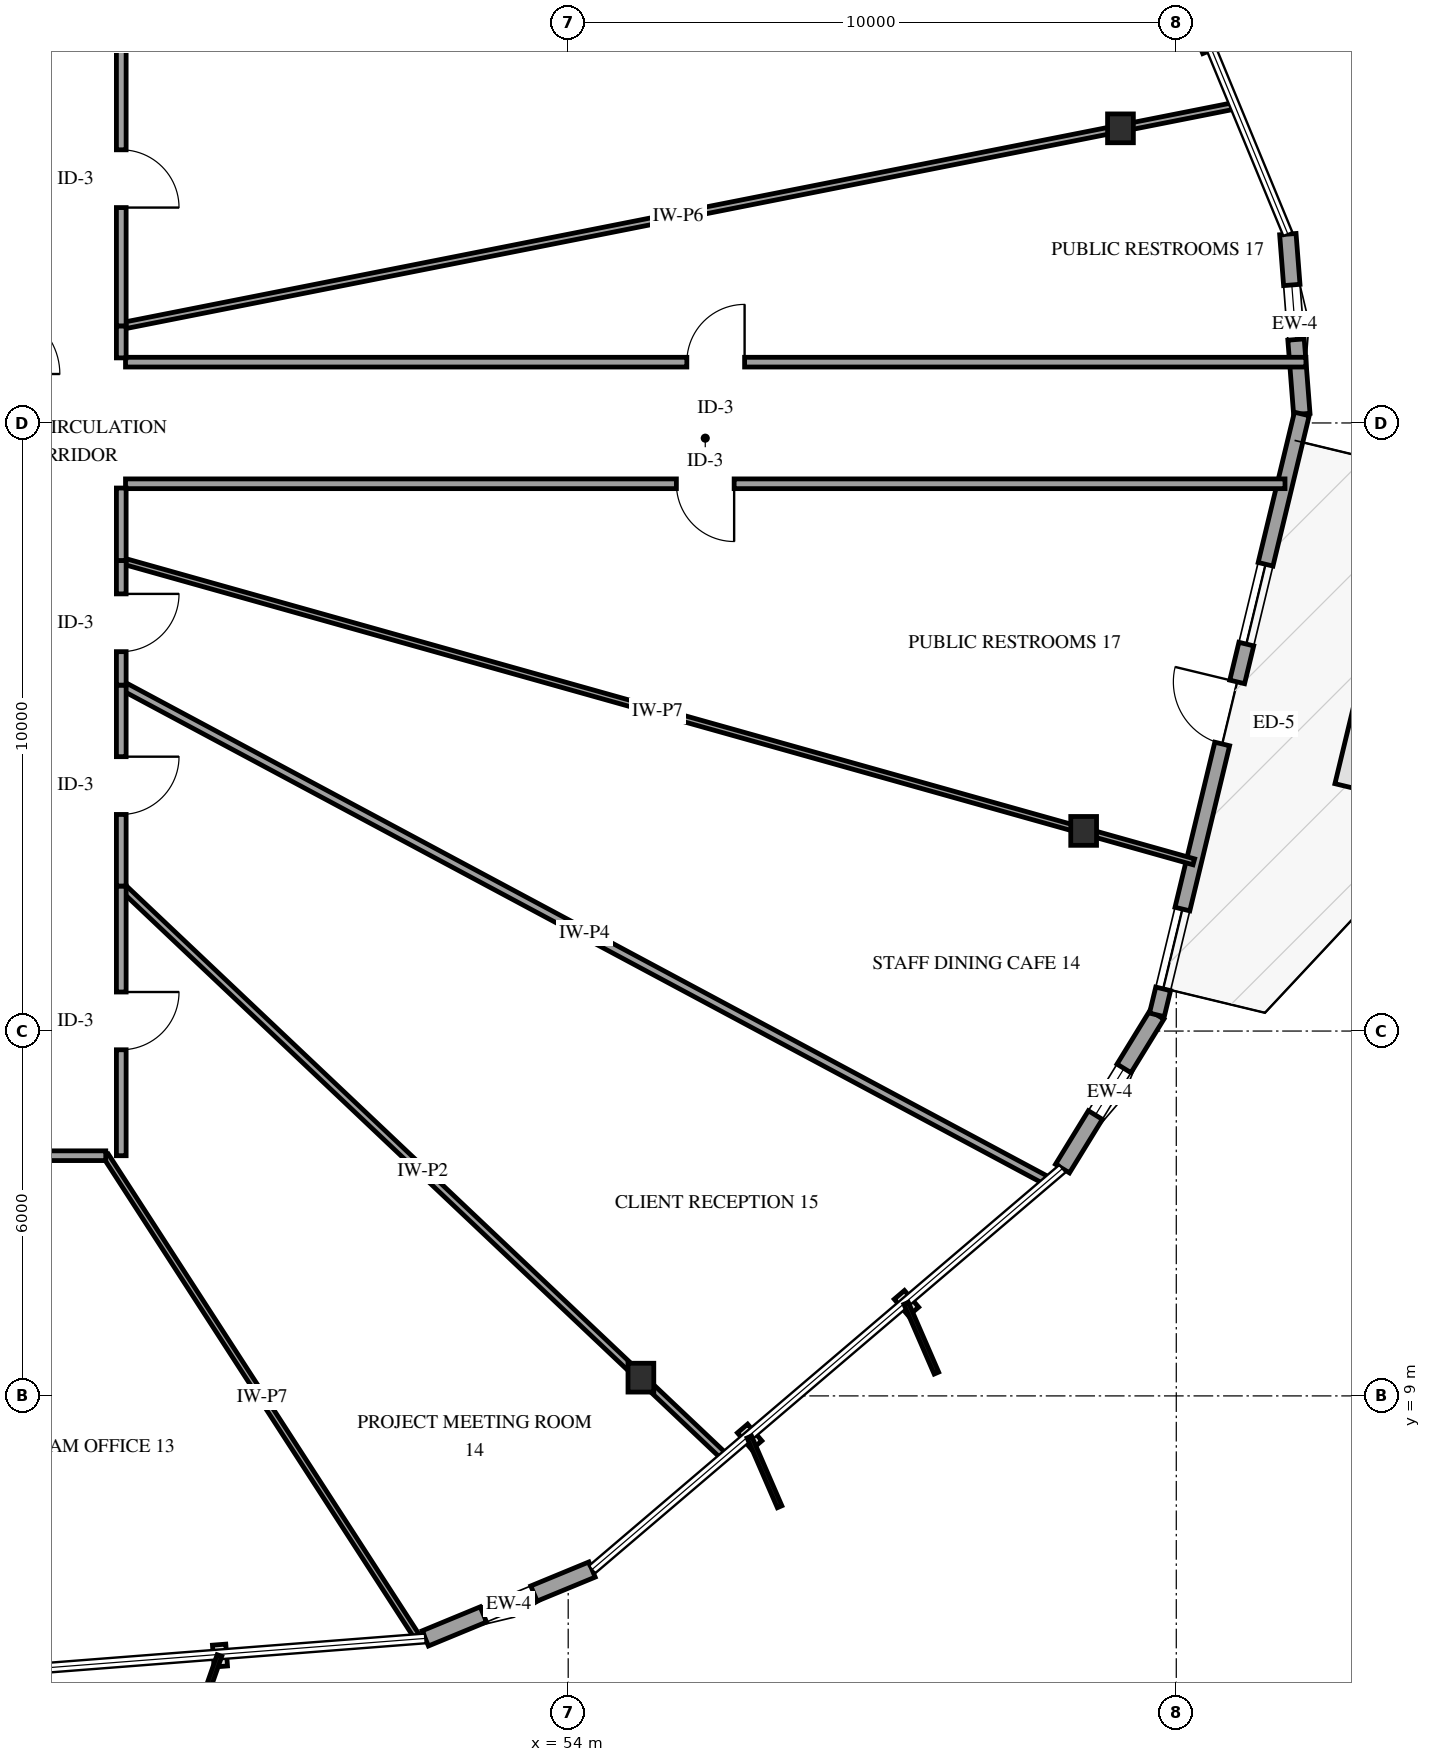
"""IFC4 building model, lengths in metres.
Left out: names, types, materials, properties, quantities, classifications, styles, units other than length and angle.
Written with IfcOpenShell. Run it as: python <this file> out.ifc"""

import sys

from ifc_helpers import new_model, si_unit, direction, frame, frame_2d, origin, origin_2d, place, context, subcontext, project, spatial, rectangle, i_section, extrude, element, fill, save


model = new_model("IFC4")
c1 = context("Model", 3, precision=1e-05, world=origin(), true_north=direction((0.0, 1.0)))
c2 = subcontext(c1, "Body", "Model", "MODEL_VIEW")
j1 = project(units=[si_unit("LENGTHUNIT", "METRE"), si_unit("PLANEANGLEUNIT", "RADIAN")], contexts=[c1])
p1 = place(None, origin())
s1 = spatial("IfcSite", under=j1, at=p1, CompositionType="ELEMENT")
p2 = place(p1, origin())
s2 = spatial("IfcBuilding", under=s1, at=p2, CompositionType="ELEMENT")
p3 = place(p2, frame((0.0, 0.0, 50.6)))
s3 = spatial("IfcBuildingStorey", under=s2, at=p3, CompositionType="ELEMENT", Elevation=50.6)
for number, where, z_axis, x_axis in (
    (1, (63.082, 29.845, 0.0), (0.0, 0.0, 1.0), (1.0, 0.0, 0.0)),
    (2, (55.196, 9.3, 0.0), (0.0, 0.0, 1.0), (1.0, 0.0, 0.0)),
    (3, (62.477, 18.292, 0.0), (0.0, 0.0, 1.0), (1.0, 0.0, 0.0)),
):
    element("IfcColumn", number, at=place(p3, frame(where, z_axis=z_axis, x_axis=x_axis)), inside=s3, PredefinedType="COLUMN", context=c2, shape_type="SweptSolid", body=[
        extrude(i_section(OverallWidth=0.424, OverallDepth=0.474, WebThickness=0.048, FlangeThickness=0.077, FilletRadius=0.038, at=origin_2d()), origin(), (0.0, 0.0, 1.0), 4.0),
    ])
p4 = place(p3, frame((51.65, 5.012, 0.0), z_axis=(0.0, 0.0, 1.0), x_axis=(0.924287306496, 0.381697491544, 0.0)))
e4 = element("IfcWall", 4, at=p4, inside=s3, PredefinedType="SOLIDWALL", context=c2, shape_type="SweptSolid", body=[
    extrude(rectangle(XDim=2.967, YDim=0.27, at=frame_2d((1.483, 0.0))), origin(), (0.0, 0.0, 1.0), 3.079),
])
p5 = place(p4, frame((1.033, 0.0, 0.75)))
e5 = element("IfcOpeningElement", 5, at=p5, cuts=e4, PredefinedType="OPENING", context=c2, shape_type="SweptSolid", body=[
    extrude(rectangle(XDim=0.9, YDim=1.5, at=frame_2d((0.45, 0.75))), frame((0.0, 0.145, 0.0), z_axis=(0.0, -1.0, 0.0), x_axis=(1.0, 0.0, 0.0)), (0.0, 0.0, 1.0), 0.29),
])
p6 = place(p3, frame((62.128, 12.738, 0.0), z_axis=(0.0, 0.0, 1.0), x_axis=(0.523399327402, 0.852087521371, 0.0)))
e6 = element("IfcWall", 6, at=p6, inside=s3, PredefinedType="SOLIDWALL", context=c2, shape_type="SweptSolid", body=[
    extrude(rectangle(XDim=2.967, YDim=0.27, at=frame_2d((1.483, 0.0))), origin(), (0.0, 0.0, 1.0), 3.079),
])
p7 = place(p6, frame((1.033, 0.0, 0.75)))
e7 = element("IfcOpeningElement", 7, at=p7, cuts=e6, PredefinedType="OPENING", context=c2, shape_type="SweptSolid", body=[
    extrude(rectangle(XDim=0.9, YDim=1.5, at=frame_2d((0.45, 0.75))), frame((0.0, 0.145, 0.0), z_axis=(0.0, -1.0, 0.0), x_axis=(1.0, 0.0, 0.0)), (0.0, 0.0, 1.0), 0.29),
])
p8 = place(p3, frame((66.064, 25.148, 0.0), z_axis=(0.0, 0.0, 1.0), x_axis=(-0.077363609715, 0.997002944776, 0.0)))
e8 = element("IfcWall", 8, at=p8, inside=s3, PredefinedType="SOLIDWALL", context=c2, shape_type="SweptSolid", body=[
    extrude(rectangle(XDim=2.966, YDim=0.27, at=frame_2d((1.483, 0.0))), origin(), (0.0, 0.0, 1.0), 3.079),
])
p9 = place(p8, frame((1.228, 0.0, 0.75)))
e9 = element("IfcOpeningElement", 9, at=p9, cuts=e8, PredefinedType="OPENING", context=c2, shape_type="SweptSolid", body=[
    extrude(rectangle(XDim=0.9, YDim=1.5, at=frame_2d((0.45, 0.75))), frame((0.0, 0.145, 0.0), z_axis=(0.0, -1.0, 0.0), x_axis=(1.0, 0.0, 0.0)), (0.0, 0.0, 1.0), 0.29),
])
p10 = place(p3, frame((63.681, 15.266, 0.0), z_axis=(0.0, 0.0, 1.0), x_axis=(0.234457403368, 0.972126394049, 0.0)))
e10 = element("IfcWall", 10, at=p10, inside=s3, PredefinedType="SOLIDWALL", context=c2, shape_type="SweptSolid", body=[
    extrude(rectangle(XDim=10.165, YDim=0.25, at=frame_2d((5.083, 0.0))), origin(), (0.0, 0.0, 1.0), 3.079),
])
p11 = place(p10, frame((4.583, 0.0, 0.0)))
e11 = element("IfcOpeningElement", 11, at=p11, cuts=e10, PredefinedType="OPENING", context=c2, shape_type="SweptSolid", body=[
    extrude(rectangle(XDim=1.05, YDim=2.15, at=frame_2d((0.525, 1.075))), frame((0.0, 0.135, 0.0), z_axis=(0.0, -1.0, 0.0), x_axis=(1.0, 0.0, 0.0)), (0.0, 0.0, 1.0), 0.27),
])
p12 = place(p10, frame((0.44, 0.0, 0.72)))
e12 = element("IfcOpeningElement", 12, at=p12, cuts=e10, PredefinedType="OPENING", context=c2, shape_type="SweptSolid", body=[
    extrude(rectangle(XDim=1.35, YDim=1.65, at=frame_2d((0.675, 0.825))), frame((0.0, 0.135, 0.0), z_axis=(0.0, -1.0, 0.0), x_axis=(1.0, 0.0, 0.0)), (0.0, 0.0, 1.0), 0.27),
])
p13 = place(p10, frame((6.273, 0.0, 0.72)))
e13 = element("IfcOpeningElement", 13, at=p13, cuts=e10, PredefinedType="OPENING", context=c2, shape_type="SweptSolid", body=[
    extrude(rectangle(XDim=1.35, YDim=1.65, at=frame_2d((0.675, 0.825))), frame((0.0, 0.135, 0.0), z_axis=(0.0, -1.0, 0.0), x_axis=(1.0, 0.0, 0.0)), (0.0, 0.0, 1.0), 0.27),
])
p14 = place(p3, frame((46.72, 26.0, 0.0), z_axis=(0.0, 0.0, 1.0), x_axis=(1.0, 0.0, 0.0)))
e14 = element("IfcWall", 14, at=p14, inside=s3, PredefinedType="PARTITIONING", context=c2, shape_type="SweptSolid", body=[
    extrude(rectangle(XDim=19.412, YDim=0.16, at=frame_2d((9.706, 0.0))), origin(), (0.0, 0.0, 1.0), 3.7),
])
p15 = place(p14, frame((9.231, 0.0, 0.0)))
e15 = element("IfcOpeningElement", 15, at=p15, cuts=e14, PredefinedType="OPENING", context=c2, shape_type="SweptSolid", body=[
    extrude(rectangle(XDim=0.95, YDim=2.15, at=frame_2d((0.475, 1.075))), frame((0.0, 0.09, 0.0), z_axis=(0.0, -1.0, 0.0), x_axis=(1.0, 0.0, 0.0)), (0.0, 0.0, 1.0), 0.18),
])
p16 = place(p3, frame((65.788, 24.0, 0.0), z_axis=(0.0, 0.0, 1.0), x_axis=(-1.0, 0.0, 0.0)))
e16 = element("IfcWall", 16, at=p16, inside=s3, PredefinedType="PARTITIONING", context=c2, shape_type="SweptSolid", body=[
    extrude(rectangle(XDim=19.068, YDim=0.16, at=frame_2d((9.534, 0.0))), origin(), (0.0, 0.0, 1.0), 3.7),
])
p17 = place(p16, frame((9.059, 0.0, 0.0)))
e17 = element("IfcOpeningElement", 17, at=p17, cuts=e16, PredefinedType="OPENING", context=c2, shape_type="SweptSolid", body=[
    extrude(rectangle(XDim=0.95, YDim=2.15, at=frame_2d((0.475, 1.075))), frame((0.0, 0.09, 0.0), z_axis=(0.0, -1.0, 0.0), x_axis=(1.0, 0.0, 0.0)), (0.0, 0.0, 1.0), 0.18),
])
p18 = place(p3, frame((46.65, 26.593, 0.0), z_axis=(0.0, 0.0, 1.0), x_axis=(0.980976030909, 0.194128892185, 0.0)))
e18 = element("IfcWall", 18, at=p18, inside=s3, PredefinedType="PARTITIONING", context=c2, shape_type="SweptSolid", body=[
    extrude(rectangle(XDim=18.668, YDim=0.11, at=frame_2d((9.334, 0.0))), origin(), (0.0, 0.0, 1.0), 2.995),
])
p19 = place(p3, frame((46.65, 22.738, 0.0), z_axis=(0.0, 0.0, 1.0), x_axis=(0.962731430865, -0.270459224329, 0.0)))
e19 = element("IfcWall", 19, at=p19, inside=s3, PredefinedType="PARTITIONING", context=c2, shape_type="SweptSolid", body=[
    extrude(rectangle(XDim=18.321, YDim=0.1, at=frame_2d((9.161, 0.0))), origin(), (0.0, 0.0, 1.0), 2.995),
])
p20 = place(p3, frame((46.65, 20.689, 0.0), z_axis=(0.0, 0.0, 1.0), x_axis=(0.881605315222, -0.471987360182, 0.0)))
e20 = element("IfcWall", 20, at=p20, inside=s3, PredefinedType="PARTITIONING", context=c2, shape_type="SweptSolid", body=[
    extrude(rectangle(XDim=17.282, YDim=0.14, at=frame_2d((8.641, 0.0))), origin(), (0.0, 0.0, 1.0), 3.078),
])
p21 = place(p3, frame((46.65, 17.385, 0.0), z_axis=(0.0, 0.0, 1.0), x_axis=(0.726395560774, -0.68727686509, 0.0)))
e21 = element("IfcWall", 21, at=p21, inside=s3, PredefinedType="PARTITIONING", context=c2, shape_type="SweptSolid", body=[
    extrude(rectangle(XDim=13.655, YDim=0.12, at=frame_2d((6.828, 0.0))), origin(), (0.0, 0.0, 1.0), 2.995),
])
p22 = place(p3, frame((46.395, 12.95, 0.0), z_axis=(0.0, 0.0, 1.0), x_axis=(0.54324379199, -0.839575001095, 0.0)))
e22 = element("IfcWall", 22, at=p22, inside=s3, PredefinedType="PARTITIONING", context=c2, shape_type="SweptSolid", body=[
    extrude(rectangle(XDim=9.466, YDim=0.1, at=frame_2d((4.733, 0.0))), origin(), (0.0, 0.0, 1.0), 3.078),
])
p23 = place(p3, frame((46.65, 31.442, 0.0), z_axis=(0.0, 0.0, 1.0), x_axis=(0.0, -1.0, 0.0)))
e23 = element("IfcWall", 23, at=p23, inside=s3, PredefinedType="PARTITIONING", context=c2, shape_type="SweptSolid", body=[
    extrude(rectangle(XDim=4.849, YDim=0.16, at=frame_2d((2.424, 0.0))), origin(), (0.0, 0.0, 1.0), 3.7),
])
p24 = place(p23, frame((1.95, 0.0, 0.0)))
e24 = element("IfcOpeningElement", 24, at=p24, cuts=e23, PredefinedType="OPENING", context=c2, shape_type="SweptSolid", body=[
    extrude(rectangle(XDim=0.95, YDim=2.15, at=frame_2d((0.475, 1.075))), frame((0.0, 0.09, 0.0), z_axis=(0.0, -1.0, 0.0), x_axis=(1.0, 0.0, 0.0)), (0.0, 0.0, 1.0), 0.18),
])
p25 = place(p3, frame((46.65, 17.385, 0.0), z_axis=(0.0, 0.0, 1.0), x_axis=(0.0, -1.0, 0.0)))
e25 = element("IfcWall", 25, at=p25, inside=s3, PredefinedType="PARTITIONING", context=c2, shape_type="SweptSolid", body=[
    extrude(rectangle(XDim=4.435, YDim=0.16, at=frame_2d((2.218, 0.0))), origin(), (0.0, 0.0, 1.0), 3.7),
])
p26 = place(p25, frame((1.743, 0.0, 0.0)))
e26 = element("IfcOpeningElement", 26, at=p26, cuts=e25, PredefinedType="OPENING", context=c2, shape_type="SweptSolid", body=[
    extrude(rectangle(XDim=0.95, YDim=2.15, at=frame_2d((0.475, 1.075))), frame((0.0, 0.09, 0.0), z_axis=(0.0, -1.0, 0.0), x_axis=(1.0, 0.0, 0.0)), (0.0, 0.0, 1.0), 0.18),
])
p27 = place(p3, frame((46.395, 12.95, 0.0), z_axis=(0.0, 0.0, 1.0), x_axis=(-1.0, 0.0, 0.0)))
e27 = element("IfcWall", 27, at=p27, inside=s3, PredefinedType="PARTITIONING", context=c2, shape_type="SweptSolid", body=[
    extrude(rectangle(XDim=4.301, YDim=0.16, at=frame_2d((2.15, 0.0))), origin(), (0.0, 0.0, 1.0), 3.7),
])
p28 = place(p27, frame((1.676, 0.0, 0.0)))
e28 = element("IfcOpeningElement", 28, at=p28, cuts=e27, PredefinedType="OPENING", context=c2, shape_type="SweptSolid", body=[
    extrude(rectangle(XDim=0.95, YDim=2.15, at=frame_2d((0.475, 1.075))), frame((0.0, 0.09, 0.0), z_axis=(0.0, -1.0, 0.0), x_axis=(1.0, 0.0, 0.0)), (0.0, 0.0, 1.0), 0.18),
])
p29 = place(p3, frame((46.65, 20.689, 0.0), z_axis=(0.0, 0.0, 1.0), x_axis=(0.0, -1.0, 0.0)))
e29 = element("IfcWall", 29, at=p29, inside=s3, PredefinedType="PARTITIONING", context=c2, shape_type="SweptSolid", body=[
    extrude(rectangle(XDim=3.304, YDim=0.16, at=frame_2d((1.652, 0.0))), origin(), (0.0, 0.0, 1.0), 3.7),
])
p30 = place(p29, frame((1.177, 0.0, 0.0)))
e30 = element("IfcOpeningElement", 30, at=p30, cuts=e29, PredefinedType="OPENING", context=c2, shape_type="SweptSolid", body=[
    extrude(rectangle(XDim=0.95, YDim=2.15, at=frame_2d((0.475, 1.075))), frame((0.0, 0.09, 0.0), z_axis=(0.0, -1.0, 0.0), x_axis=(1.0, 0.0, 0.0)), (0.0, 0.0, 1.0), 0.18),
])
p31 = place(p3, frame((46.65, 22.738, 0.0), z_axis=(0.0, 0.0, 1.0), x_axis=(0.0, -1.0, 0.0)))
e31 = element("IfcWall", 31, at=p31, inside=s3, PredefinedType="PARTITIONING", context=c2, shape_type="SweptSolid", body=[
    extrude(rectangle(XDim=2.049, YDim=0.16, at=frame_2d((1.024, 0.0))), origin(), (0.0, 0.0, 1.0), 3.7),
])
p32 = place(p31, frame((0.549, 0.0, 0.0)))
e32 = element("IfcOpeningElement", 32, at=p32, cuts=e31, PredefinedType="OPENING", context=c2, shape_type="SweptSolid", body=[
    extrude(rectangle(XDim=0.95, YDim=2.15, at=frame_2d((0.475, 1.075))), frame((0.0, 0.09, 0.0), z_axis=(0.0, -1.0, 0.0), x_axis=(1.0, 0.0, 0.0)), (0.0, 0.0, 1.0), 0.18),
])
p33 = place(p3, frame((46.65, 23.93, 0.0), z_axis=(0.0, 0.0, 1.0), x_axis=(0.0, -1.0, 0.0)))
e33 = element("IfcWall", 33, at=p33, inside=s3, PredefinedType="PARTITIONING", context=c2, shape_type="SweptSolid", body=[
    extrude(rectangle(XDim=1.192, YDim=0.16, at=frame_2d((0.596, 0.0))), origin(), (0.0, 0.0, 1.0), 3.7),
])
p34 = place(p3, frame((46.65, 26.593, 0.0), z_axis=(0.0, 0.0, 1.0), x_axis=(0.0, -1.0, 0.0)))
e34 = element("IfcWall", 34, at=p34, inside=s3, PredefinedType="PARTITIONING", context=c2, shape_type="SweptSolid", body=[
    extrude(rectangle(XDim=0.523, YDim=0.16, at=frame_2d((0.261, 0.0))), origin(), (0.0, 0.0, 1.0), 3.7),
])
p35 = place(p5, origin())
e35 = element("IfcWindow", 35, at=p35, inside=s3, PartitioningType="SINGLE_PANEL", PredefinedType="WINDOW", context=c2, shape_type="SweptSolid", body=[
    extrude(rectangle(XDim=0.9, YDim=1.5, at=frame_2d((0.45, 0.75))), frame((0.0, 0.03, 0.0), z_axis=(0.0, -1.0, 0.0), x_axis=(1.0, 0.0, 0.0)), (0.0, 0.0, 1.0), 0.06),
])
fill(e5, e35)
p36 = place(p7, origin())
e36 = element("IfcWindow", 36, at=p36, inside=s3, PartitioningType="SINGLE_PANEL", PredefinedType="WINDOW", context=c2, shape_type="SweptSolid", body=[
    extrude(rectangle(XDim=0.9, YDim=1.5, at=frame_2d((0.45, 0.75))), frame((0.0, 0.03, 0.0), z_axis=(0.0, -1.0, 0.0), x_axis=(1.0, 0.0, 0.0)), (0.0, 0.0, 1.0), 0.06),
])
fill(e7, e36)
p37 = place(p9, origin())
e37 = element("IfcWindow", 37, at=p37, inside=s3, PartitioningType="SINGLE_PANEL", PredefinedType="WINDOW", context=c2, shape_type="SweptSolid", body=[
    extrude(rectangle(XDim=0.9, YDim=1.5, at=frame_2d((0.45, 0.75))), frame((0.0, 0.03, 0.0), z_axis=(0.0, -1.0, 0.0), x_axis=(1.0, 0.0, 0.0)), (0.0, 0.0, 1.0), 0.06),
])
fill(e9, e37)
p38 = place(p11, origin())
e38 = element("IfcDoor", 38, at=p38, inside=s3, OperationType="SINGLE_SWING_RIGHT", PredefinedType="DOOR", context=c2, shape_type="SweptSolid", body=[
    extrude(rectangle(XDim=1.05, YDim=2.15, at=frame_2d((0.525, 1.075))), frame((0.0, 0.025, 0.0), z_axis=(0.0, -1.0, 0.0), x_axis=(1.0, 0.0, 0.0)), (0.0, 0.0, 1.0), 0.05),
])
fill(e11, e38)
p39 = place(p12, origin())
e39 = element("IfcWindow", 39, at=p39, inside=s3, PartitioningType="SINGLE_PANEL", PredefinedType="WINDOW", context=c2, shape_type="SweptSolid", body=[
    extrude(rectangle(XDim=1.35, YDim=1.65, at=frame_2d((0.675, 0.825))), frame((0.0, 0.03, 0.0), z_axis=(0.0, -1.0, 0.0), x_axis=(1.0, 0.0, 0.0)), (0.0, 0.0, 1.0), 0.06),
])
fill(e12, e39)
p40 = place(p13, origin())
e40 = element("IfcWindow", 40, at=p40, inside=s3, PartitioningType="SINGLE_PANEL", PredefinedType="WINDOW", context=c2, shape_type="SweptSolid", body=[
    extrude(rectangle(XDim=1.35, YDim=1.65, at=frame_2d((0.675, 0.825))), frame((0.0, 0.03, 0.0), z_axis=(0.0, -1.0, 0.0), x_axis=(1.0, 0.0, 0.0)), (0.0, 0.0, 1.0), 0.06),
])
fill(e13, e40)
p41 = place(p15, origin())
e41 = element("IfcDoor", 41, at=p41, inside=s3, OperationType="SINGLE_SWING_RIGHT", PredefinedType="DOOR", context=c2, shape_type="SweptSolid", body=[
    extrude(rectangle(XDim=0.95, YDim=2.15, at=frame_2d((0.475, 1.075))), frame((0.0, 0.025, 0.0), z_axis=(0.0, -1.0, 0.0), x_axis=(1.0, 0.0, 0.0)), (0.0, 0.0, 1.0), 0.05),
])
fill(e15, e41)
p42 = place(p17, origin())
e42 = element("IfcDoor", 42, at=p42, inside=s3, OperationType="SINGLE_SWING_LEFT", PredefinedType="DOOR", context=c2, shape_type="SweptSolid", body=[
    extrude(rectangle(XDim=0.95, YDim=2.15, at=frame_2d((0.475, 1.075))), frame((0.0, 0.025, 0.0), z_axis=(0.0, -1.0, 0.0), x_axis=(1.0, 0.0, 0.0)), (0.0, 0.0, 1.0), 0.05),
])
fill(e17, e42)
p43 = place(p24, origin())
e43 = element("IfcDoor", 43, at=p43, inside=s3, OperationType="SINGLE_SWING_RIGHT", PredefinedType="DOOR", context=c2, shape_type="SweptSolid", body=[
    extrude(rectangle(XDim=0.95, YDim=2.15, at=frame_2d((0.475, 1.075))), frame((0.0, 0.025, 0.0), z_axis=(0.0, -1.0, 0.0), x_axis=(1.0, 0.0, 0.0)), (0.0, 0.0, 1.0), 0.05),
])
fill(e24, e43)
p44 = place(p26, origin())
e44 = element("IfcDoor", 44, at=p44, inside=s3, OperationType="SINGLE_SWING_LEFT", PredefinedType="DOOR", context=c2, shape_type="SweptSolid", body=[
    extrude(rectangle(XDim=0.95, YDim=2.15, at=frame_2d((0.475, 1.075))), frame((0.0, 0.025, 0.0), z_axis=(0.0, -1.0, 0.0), x_axis=(1.0, 0.0, 0.0)), (0.0, 0.0, 1.0), 0.05),
])
fill(e26, e44)
p45 = place(p30, origin())
e45 = element("IfcDoor", 45, at=p45, inside=s3, OperationType="SINGLE_SWING_LEFT", PredefinedType="DOOR", context=c2, shape_type="SweptSolid", body=[
    extrude(rectangle(XDim=0.95, YDim=2.15, at=frame_2d((0.475, 1.075))), frame((0.0, 0.025, 0.0), z_axis=(0.0, -1.0, 0.0), x_axis=(1.0, 0.0, 0.0)), (0.0, 0.0, 1.0), 0.05),
])
fill(e30, e45)
p46 = place(p32, origin())
e46 = element("IfcDoor", 46, at=p46, inside=s3, OperationType="SINGLE_SWING_LEFT", PredefinedType="DOOR", context=c2, shape_type="SweptSolid", body=[
    extrude(rectangle(XDim=0.95, YDim=2.15, at=frame_2d((0.475, 1.075))), frame((0.0, 0.025, 0.0), z_axis=(0.0, -1.0, 0.0), x_axis=(1.0, 0.0, 0.0)), (0.0, 0.0, 1.0), 0.05),
])
fill(e32, e46)
save(model, sys.argv[1])
